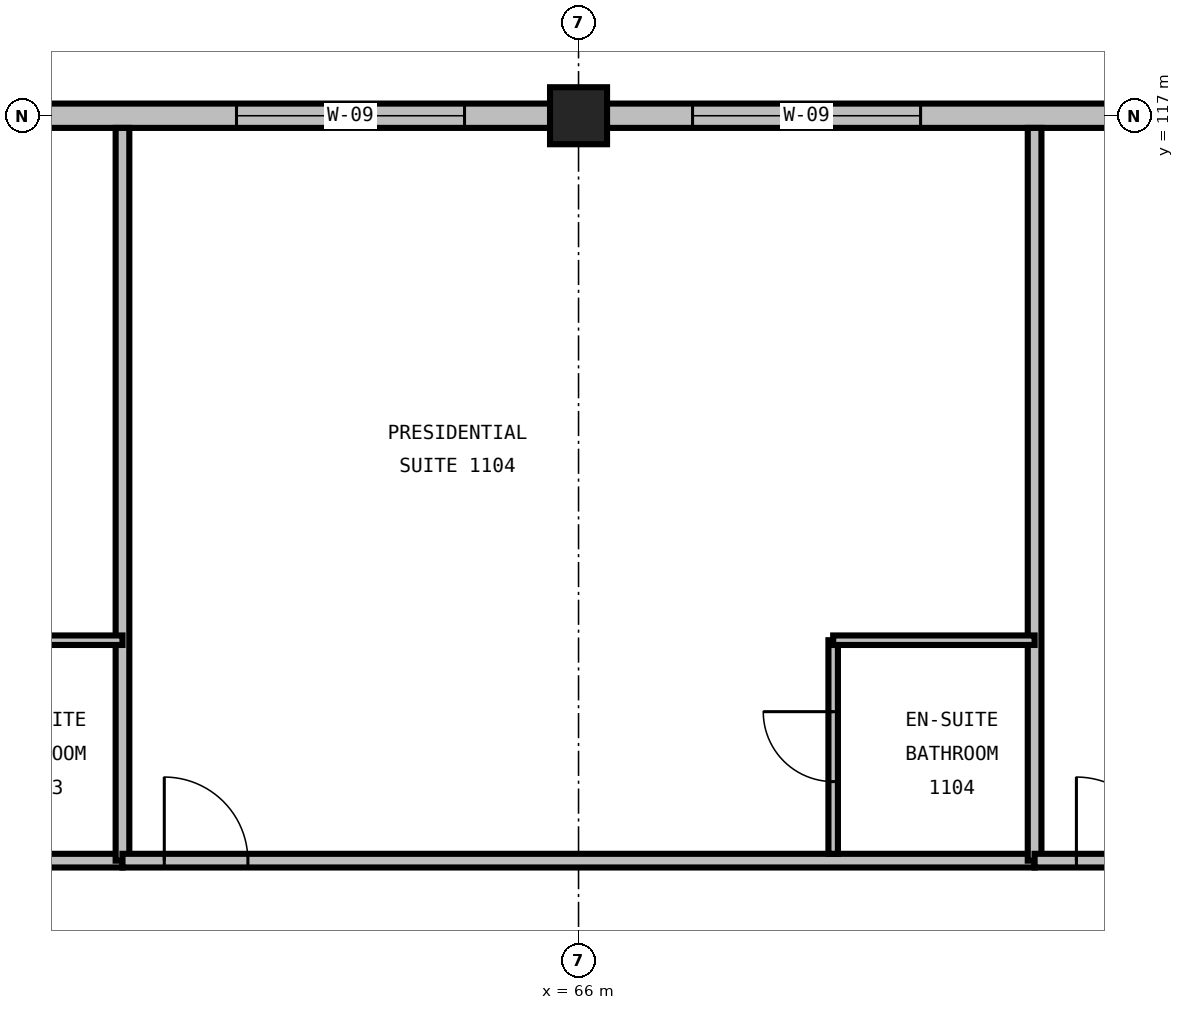
"""IFC4 building model, lengths in metres.
Left out: names, types, materials, properties, quantities, classifications, styles, units other than length and angle.
Written with IfcOpenShell. Run it as: python <this file> out.ifc"""

import sys

from ifc_helpers import new_model, si_unit, direction, frame, frame_2d, origin, origin_2d, place, context, subcontext, project, spatial, rectangle, extrude, element, fill, save


model = new_model("IFC4")
c1 = context("Model", 3, precision=1e-05, world=origin(), true_north=direction((0.0, 1.0)))
c2 = subcontext(c1, "Body", "Model", "MODEL_VIEW")
j1 = project(units=[si_unit("LENGTHUNIT", "METRE"), si_unit("PLANEANGLEUNIT", "RADIAN")], contexts=[c1])
p1 = place(None, origin())
s1 = spatial("IfcSite", under=j1, at=p1, CompositionType="ELEMENT")
p2 = place(p1, origin())
s2 = spatial("IfcBuilding", under=s1, at=p2, CompositionType="ELEMENT")
p3 = place(p2, frame((0.0, 0.0, 49.2)))
s3 = spatial("IfcBuildingStorey", under=s2, at=p3, CompositionType="ELEMENT", Elevation=49.2)
p4 = place(p3, frame((66.0, 117.0, 0.0), z_axis=(0.0, 0.0, 1.0), x_axis=(1.0, 0.0, 0.0)))
e1 = element("IfcColumn", 1, at=p4, inside=s3, PredefinedType="COLUMN", context=c2, shape_type="SweptSolid", body=[
    extrude(rectangle(XDim=0.75, YDim=0.75, at=origin_2d()), origin(), (0.0, 0.0, 1.0), 3.6),
])
p5 = place(p3, frame((66.0, 117.0, 0.0), z_axis=(0.0, 0.0, 1.0), x_axis=(-1.0, 0.0, 0.0)))
e2 = element("IfcWall", 2, at=p5, inside=s3, PredefinedType="STANDARD", context=c2, shape_type="SweptSolid", body=[
    extrude(rectangle(XDim=12.0, YDim=0.32, at=frame_2d((6.0, 0.0))), origin(), (0.0, 0.0, 1.0), 2.536),
])
p6 = place(p5, frame((1.5, 0.0, 0.7)))
e3 = element("IfcOpeningElement", 3, at=p6, cuts=e2, PredefinedType="OPENING", context=c2, shape_type="SweptSolid", body=[
    extrude(rectangle(XDim=3.0, YDim=1.71, at=frame_2d((1.5, 0.855))), frame((0.0, 0.175, 0.0), z_axis=(0.0, -1.0, 0.0), x_axis=(1.0, 0.0, 0.0)), (0.0, 0.0, 1.0), 0.35),
])
p7 = place(p5, frame((7.5, 0.0, 0.7)))
e4 = element("IfcOpeningElement", 4, at=p7, cuts=e2, PredefinedType="OPENING", context=c2, shape_type="SweptSolid", body=[
    extrude(rectangle(XDim=3.0, YDim=1.71, at=frame_2d((1.5, 0.855))), frame((0.0, 0.175, 0.0), z_axis=(0.0, -1.0, 0.0), x_axis=(1.0, 0.0, 0.0)), (0.0, 0.0, 1.0), 0.35),
])
p8 = place(p3, frame((78.0, 117.0, 0.0), z_axis=(0.0, 0.0, 1.0), x_axis=(-1.0, 0.0, 0.0)))
e5 = element("IfcWall", 5, at=p8, inside=s3, PredefinedType="STANDARD", context=c2, shape_type="SweptSolid", body=[
    extrude(rectangle(XDim=12.0, YDim=0.32, at=frame_2d((6.0, 0.0))), origin(), (0.0, 0.0, 1.0), 2.536),
])
p9 = place(p8, frame((1.5, 0.0, 0.7)))
e6 = element("IfcOpeningElement", 6, at=p9, cuts=e5, PredefinedType="OPENING", context=c2, shape_type="SweptSolid", body=[
    extrude(rectangle(XDim=3.0, YDim=1.71, at=frame_2d((1.5, 0.855))), frame((0.0, 0.175, 0.0), z_axis=(0.0, -1.0, 0.0), x_axis=(1.0, 0.0, 0.0)), (0.0, 0.0, 1.0), 0.35),
])
p10 = place(p8, frame((7.5, 0.0, 0.7)))
e7 = element("IfcOpeningElement", 7, at=p10, cuts=e5, PredefinedType="OPENING", context=c2, shape_type="SweptSolid", body=[
    extrude(rectangle(XDim=3.0, YDim=1.71, at=frame_2d((1.5, 0.855))), frame((0.0, 0.175, 0.0), z_axis=(0.0, -1.0, 0.0), x_axis=(1.0, 0.0, 0.0)), (0.0, 0.0, 1.0), 0.35),
])
p11 = place(p3, frame((48.0, 107.2, 0.0), z_axis=(0.0, 0.0, 1.0), x_axis=(1.0, 0.0, 0.0)))
e8 = element("IfcWall", 8, at=p11, inside=s3, PredefinedType="PARTITIONING", context=c2, shape_type="SweptSolid", body=[
    extrude(rectangle(XDim=12.0, YDim=0.18, at=frame_2d((6.0, 0.0))), origin(), (0.0, 0.0, 1.0), 3.29),
])
p12 = place(p11, frame((0.55, 0.0, 0.0)))
e9 = element("IfcOpeningElement", 9, at=p12, cuts=e8, PredefinedType="OPENING", context=c2, shape_type="SweptSolid", body=[
    extrude(rectangle(XDim=1.1, YDim=2.2, at=frame_2d((0.55, 1.1))), frame((0.0, 0.105, 0.0), z_axis=(0.0, -1.0, 0.0), x_axis=(1.0, 0.0, 0.0)), (0.0, 0.0, 1.0), 0.21),
])
p13 = place(p3, frame((60.0, 107.2, 0.0), z_axis=(0.0, 0.0, 1.0), x_axis=(0.0, 1.0, 0.0)))
e10 = element("IfcWall", 10, at=p13, inside=s3, PredefinedType="PARTITIONING", context=c2, shape_type="SweptSolid", body=[
    extrude(rectangle(XDim=9.64, YDim=0.18, at=frame_2d((4.82, 0.0))), origin(), (0.0, 0.0, 1.0), 3.29),
])
p14 = place(p3, frame((57.35, 110.1, 0.0), z_axis=(0.0, 0.0, 1.0), x_axis=(1.0, 0.0, 0.0)))
e11 = element("IfcWall", 11, at=p14, inside=s3, PredefinedType="PARTITIONING", context=c2, shape_type="SweptSolid", body=[
    extrude(rectangle(XDim=2.65, YDim=0.125, at=frame_2d((1.325, 0.0))), origin(), (0.0, 0.0, 1.0), 3.29),
])
p15 = place(p3, frame((60.0, 107.2, 0.0), z_axis=(0.0, 0.0, 1.0), x_axis=(1.0, 0.0, 0.0)))
e12 = element("IfcWall", 12, at=p15, inside=s3, PredefinedType="PARTITIONING", context=c2, shape_type="SweptSolid", body=[
    extrude(rectangle(XDim=12.0, YDim=0.18, at=frame_2d((6.0, 0.0))), origin(), (0.0, 0.0, 1.0), 3.29),
])
p16 = place(p15, frame((0.55, 0.0, 0.0)))
e13 = element("IfcOpeningElement", 13, at=p16, cuts=e12, PredefinedType="OPENING", context=c2, shape_type="SweptSolid", body=[
    extrude(rectangle(XDim=1.1, YDim=2.2, at=frame_2d((0.55, 1.1))), frame((0.0, 0.105, 0.0), z_axis=(0.0, -1.0, 0.0), x_axis=(1.0, 0.0, 0.0)), (0.0, 0.0, 1.0), 0.21),
])
p17 = place(p3, frame((72.0, 107.2, 0.0), z_axis=(0.0, 0.0, 1.0), x_axis=(0.0, 1.0, 0.0)))
e14 = element("IfcWall", 14, at=p17, inside=s3, PredefinedType="PARTITIONING", context=c2, shape_type="SweptSolid", body=[
    extrude(rectangle(XDim=9.64, YDim=0.18, at=frame_2d((4.82, 0.0))), origin(), (0.0, 0.0, 1.0), 3.29),
])
p18 = place(p3, frame((69.35, 107.29, 0.0), z_axis=(0.0, 0.0, 1.0), x_axis=(0.0, 1.0, 0.0)))
e15 = element("IfcWall", 15, at=p18, inside=s3, PredefinedType="PARTITIONING", context=c2, shape_type="SweptSolid", body=[
    extrude(rectangle(XDim=2.81, YDim=0.125, at=frame_2d((1.405, 0.0))), origin(), (0.0, 0.0, 1.0), 3.29),
])
p19 = place(p18, frame((0.95, 0.0, 0.0)))
e16 = element("IfcOpeningElement", 16, at=p19, cuts=e15, PredefinedType="OPENING", context=c2, shape_type="SweptSolid", body=[
    extrude(rectangle(XDim=0.92, YDim=2.1, at=frame_2d((0.46, 1.05))), frame((0.0, 0.077, 0.0), z_axis=(0.0, -1.0, 0.0), x_axis=(1.0, 0.0, 0.0)), (0.0, 0.0, 1.0), 0.155),
])
p20 = place(p3, frame((69.35, 110.1, 0.0), z_axis=(0.0, 0.0, 1.0), x_axis=(1.0, 0.0, 0.0)))
e17 = element("IfcWall", 17, at=p20, inside=s3, PredefinedType="PARTITIONING", context=c2, shape_type="SweptSolid", body=[
    extrude(rectangle(XDim=2.65, YDim=0.125, at=frame_2d((1.325, 0.0))), origin(), (0.0, 0.0, 1.0), 3.29),
])
p21 = place(p3, frame((72.0, 107.2, 0.0), z_axis=(0.0, 0.0, 1.0), x_axis=(1.0, 0.0, 0.0)))
e18 = element("IfcWall", 18, at=p21, inside=s3, PredefinedType="PARTITIONING", context=c2, shape_type="SweptSolid", body=[
    extrude(rectangle(XDim=11.915, YDim=0.18, at=frame_2d((5.957, 0.0))), origin(), (0.0, 0.0, 1.0), 3.29),
])
p22 = place(p21, frame((0.55, 0.0, 0.0)))
e19 = element("IfcOpeningElement", 19, at=p22, cuts=e18, PredefinedType="OPENING", context=c2, shape_type="SweptSolid", body=[
    extrude(rectangle(XDim=1.1, YDim=2.2, at=frame_2d((0.55, 1.1))), frame((0.0, 0.105, 0.0), z_axis=(0.0, -1.0, 0.0), x_axis=(1.0, 0.0, 0.0)), (0.0, 0.0, 1.0), 0.21),
])
p23 = place(p6, origin())
e20 = element("IfcWindow", 20, at=p23, inside=s3, PartitioningType="TRIPLE_PANEL_VERTICAL", PredefinedType="WINDOW", context=c2, shape_type="SweptSolid", body=[
    extrude(rectangle(XDim=3.0, YDim=1.71, at=frame_2d((1.5, 0.855))), frame((0.0, 0.03, 0.0), z_axis=(0.0, -1.0, 0.0), x_axis=(1.0, 0.0, 0.0)), (0.0, 0.0, 1.0), 0.06),
])
fill(e3, e20)
p24 = place(p10, origin())
e21 = element("IfcWindow", 21, at=p24, inside=s3, PartitioningType="TRIPLE_PANEL_VERTICAL", PredefinedType="WINDOW", context=c2, shape_type="SweptSolid", body=[
    extrude(rectangle(XDim=3.0, YDim=1.71, at=frame_2d((1.5, 0.855))), frame((0.0, 0.03, 0.0), z_axis=(0.0, -1.0, 0.0), x_axis=(1.0, 0.0, 0.0)), (0.0, 0.0, 1.0), 0.06),
])
fill(e7, e21)
p25 = place(p16, origin())
e22 = element("IfcDoor", 22, at=p25, inside=s3, OperationType="SINGLE_SWING_LEFT", PredefinedType="DOOR", context=c2, shape_type="SweptSolid", body=[
    extrude(rectangle(XDim=1.1, YDim=2.2, at=frame_2d((0.55, 1.1))), frame((0.0, 0.025, 0.0), z_axis=(0.0, -1.0, 0.0), x_axis=(1.0, 0.0, 0.0)), (0.0, 0.0, 1.0), 0.05),
])
fill(e13, e22)
p26 = place(p19, origin())
e23 = element("IfcDoor", 23, at=p26, inside=s3, OperationType="SINGLE_SWING_RIGHT", PredefinedType="DOOR", context=c2, shape_type="SweptSolid", body=[
    extrude(rectangle(XDim=0.92, YDim=2.1, at=frame_2d((0.46, 1.05))), frame((0.0, 0.025, 0.0), z_axis=(0.0, -1.0, 0.0), x_axis=(1.0, 0.0, 0.0)), (0.0, 0.0, 1.0), 0.05),
])
fill(e16, e23)
p27 = place(p22, origin())
e24 = element("IfcDoor", 24, at=p27, inside=s3, OperationType="SINGLE_SWING_LEFT", PredefinedType="DOOR", context=c2, shape_type="SweptSolid", body=[
    extrude(rectangle(XDim=1.1, YDim=2.2, at=frame_2d((0.55, 1.1))), frame((0.0, 0.025, 0.0), z_axis=(0.0, -1.0, 0.0), x_axis=(1.0, 0.0, 0.0)), (0.0, 0.0, 1.0), 0.05),
])
fill(e19, e24)
save(model, sys.argv[1])
